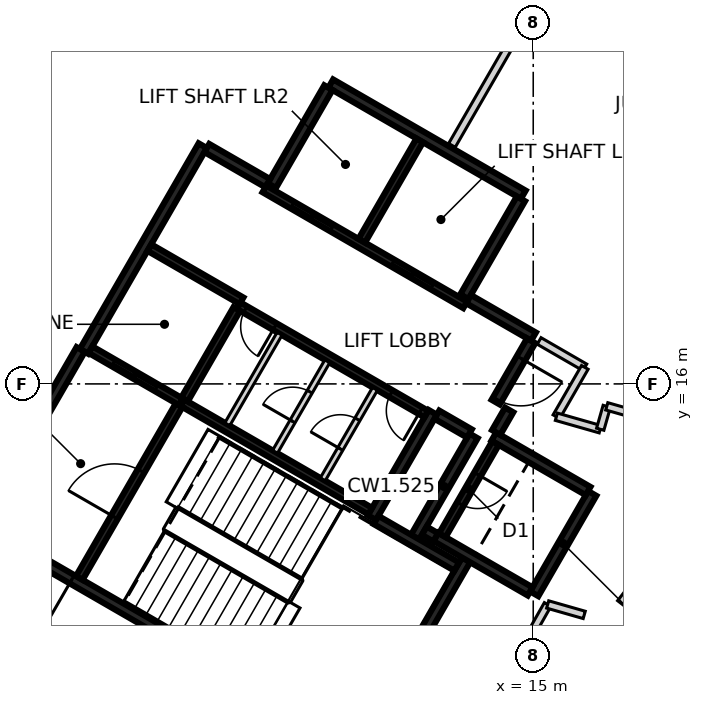
"""IFC4 building model, lengths in metres.
Left out: names, types, materials, properties, quantities, classifications, styles, units other than length and angle.
Written with IfcOpenShell. Run it as: python <this file> out.ifc"""

import sys

from ifc_helpers import new_model, si_unit, direction, frame, frame_2d, origin, place, context, subcontext, project, spatial, rectangle, extrude, element, fill, save


model = new_model("IFC4")
c1 = context("Model", 3, precision=1e-05, world=origin(), true_north=direction((0.0, 1.0)))
c2 = subcontext(c1, "Body", "Model", "MODEL_VIEW")
j1 = project(units=[si_unit("LENGTHUNIT", "METRE"), si_unit("PLANEANGLEUNIT", "RADIAN")], contexts=[c1])
p1 = place(None, origin())
s1 = spatial("IfcSite", under=j1, at=p1, CompositionType="ELEMENT")
p2 = place(p1, origin())
s2 = spatial("IfcBuilding", under=s1, at=p2, CompositionType="ELEMENT")
p3 = place(p2, frame((0.0, 0.0, 45.8)))
s3 = spatial("IfcBuildingStorey", under=s2, at=p3, CompositionType="ELEMENT", Elevation=45.8)
p4 = place(p3, frame((10.42, 6.498, 0.0), z_axis=(0.0, 0.0, 1.0), x_axis=(-0.866021906294, 0.500006057782, 0.0)))
e1 = element("IfcWall", 1, at=p4, inside=s3, PredefinedType="SHEAR", context=c2, shape_type="SweptSolid", body=[
    extrude(rectangle(XDim=11.55, YDim=0.25, at=frame_2d((5.775, 0.0))), origin(), (0.0, 0.0, 1.0), 3.125),
])
p5 = place(p4, frame((10.025, 0.0, 0.0)))
e2 = element("IfcOpeningElement", 2, at=p5, cuts=e1, PredefinedType="OPENING", context=c2, shape_type="SweptSolid", body=[
    extrude(rectangle(XDim=1.2, YDim=2.1, at=frame_2d((0.6, 1.05))), frame((0.0, 0.135, 0.0), z_axis=(0.0, -1.0, 0.0), x_axis=(1.0, 0.0, 0.0)), (0.0, 0.0, 1.0), 0.27),
])
p6 = place(p4, frame((8.725, 0.0, 0.0)))
e3 = element("IfcOpeningElement", 3, at=p6, cuts=e1, PredefinedType="OPENING", context=c2, shape_type="SweptSolid", body=[
    extrude(rectangle(XDim=1.2, YDim=2.1, at=frame_2d((0.6, 1.05))), frame((0.0, 0.135, 0.0), z_axis=(0.0, -1.0, 0.0), x_axis=(1.0, 0.0, 0.0)), (0.0, 0.0, 1.0), 0.27),
])
p7 = place(p3, frame((3.179, 16.856, 0.0), z_axis=(0.0, 0.0, 1.0), x_axis=(0.500004234368, 0.866022959057, 0.0)))
e4 = element("IfcWall", 4, at=p7, inside=s3, PredefinedType="SHEAR", context=c2, shape_type="SweptSolid", body=[
    extrude(rectangle(XDim=6.25, YDim=0.25, at=frame_2d((3.125, 0.0))), origin(), (0.0, 0.0, 1.0), 3.125),
])
p8 = place(p3, frame((9.673, 23.903, 0.0), z_axis=(0.0, 0.0, 1.0), x_axis=(0.86603616409, -0.499981362141, 0.0)))
e5 = element("IfcWall", 5, at=p8, inside=s3, PredefinedType="SHEAR", context=c2, shape_type="SweptSolid", body=[
    extrude(rectangle(XDim=5.85, YDim=0.25, at=frame_2d((2.925, 0.0))), origin(), (0.0, 0.0, 1.0), 3.125),
])
p9 = place(p3, frame((0.48, 12.381, 0.0), z_axis=(0.0, 0.0, 1.0), x_axis=(0.49999885962, 0.866026062182, 0.0)))
e6 = element("IfcWall", 6, at=p9, inside=s3, PredefinedType="SHEAR", context=c2, shape_type="SweptSolid", body=[
    extrude(rectangle(XDim=5.225, YDim=0.25, at=frame_2d((2.612, 0.0))), origin(), (0.0, 0.0, 1.0), 3.125),
])
p10 = place(p3, frame((13.238, 11.378, 0.0), z_axis=(0.0, 0.0, 1.0), x_axis=(-0.500008851346, -0.866020293397, 0.0)))
e7 = element("IfcWall", 7, at=p10, inside=s3, PredefinedType="SHEAR", context=c2, shape_type="SweptSolid", body=[
    extrude(rectangle(XDim=5.51, YDim=0.25, at=frame_2d((2.755, 0.0))), origin(), (0.0, 0.0, 1.0), 3.125),
])
p11 = place(p3, frame((12.357, 15.252, 0.0), z_axis=(0.0, 0.0, 1.0), x_axis=(-0.500028443584, -0.866008981251, 0.0)))
e8 = element("IfcWall", 8, at=p11, inside=s3, PredefinedType="SHEAR", context=c2, shape_type="SweptSolid", body=[
    extrude(rectangle(XDim=3.2, YDim=0.25, at=frame_2d((1.6, 0.0))), origin(), (0.0, 0.0, 1.0), 3.125),
])
for number, where, z_axis, x_axis in (
    (9, (8.123, 21.219, 0.0), (0.0, 0.0, 1.0), (0.5, 0.866, 0.0)),
    (10, (14.676, 20.87, 0.0), (0.0, 0.0, 1.0), (-0.5, -0.866, 0.0)),
):
    element("IfcWall", number, at=place(p3, frame(where, z_axis=z_axis, x_axis=x_axis)), inside=s3, PredefinedType="SHEAR", context=c2, shape_type="SweptSolid", body=[
        extrude(rectangle(XDim=2.975, YDim=0.25, at=frame_2d((1.487, 0.0))), origin(), (0.0, 0.0, 1.0), 3.125),
    ])
p12 = place(p3, frame((16.552, 13.119, 0.0), z_axis=(0.0, 0.0, 1.0), x_axis=(-0.499978833458, -0.866037623948, 0.0)))
e11 = element("IfcWall", 11, at=p12, inside=s3, PredefinedType="SHEAR", context=c2, shape_type="SweptSolid", body=[
    extrude(rectangle(XDim=3.05, YDim=0.25, at=frame_2d((1.525, 0.0))), origin(), (0.0, 0.0, 1.0), 3.125),
])
p13 = place(p3, frame((14.918, 10.54, 0.0), z_axis=(0.0, 0.0, 1.0), x_axis=(-0.866063538972, 0.499933942099, 0.0)))
e12 = element("IfcWall", 12, at=p13, inside=s3, PredefinedType="SHEAR", context=c2, shape_type="SweptSolid", body=[
    extrude(rectangle(XDim=2.865, YDim=0.25, at=frame_2d((1.432, 0.0))), origin(), (0.0, 0.0, 1.0), 3.125),
])
p14 = place(p3, frame((13.963, 14.614, 0.0), z_axis=(0.0, 0.0, 1.0), x_axis=(0.866042235819, -0.499970844928, 0.0)))
e13 = element("IfcWall", 13, at=p14, inside=s3, PredefinedType="SHEAR", context=c2, shape_type="SweptSolid", body=[
    extrude(rectangle(XDim=2.865, YDim=0.25, at=frame_2d((1.432, 0.0))), origin(), (0.0, 0.0, 1.0), 3.125),
])
p15 = place(p3, frame((11.888, 11.961, 0.0), z_axis=(0.0, 0.0, 1.0), x_axis=(0.500003324108, 0.866023484601, 0.0)))
e14 = element("IfcWall", 14, at=p15, inside=s3, PredefinedType="SHEAR", context=c2, shape_type="SweptSolid", body=[
    extrude(rectangle(XDim=3.085, YDim=0.25, at=frame_2d((1.542, 0.0))), origin(), (0.0, 0.0, 1.0), 3.125),
])
p16 = place(p3, frame((10.865, 12.418, 0.0), z_axis=(0.0, 0.0, 1.0), x_axis=(0.866026229868, -0.499998569178, 0.0)))
e15 = element("IfcWall", 15, at=p16, inside=s3, PredefinedType="SHEAR", context=c2, shape_type="SweptSolid", body=[
    extrude(rectangle(XDim=2.449, YDim=0.25, at=frame_2d((1.225, 0.0))), origin(), (0.0, 0.0, 1.0), 3.125),
])
p17 = place(p3, frame((13.297, 18.231, 0.0), z_axis=(0.0, 0.0, 1.0), x_axis=(0.866043531843, -0.499968599967, 0.0)))
e16 = element("IfcWall", 16, at=p17, inside=s3, PredefinedType="SHEAR", context=c2, shape_type="SweptSolid", body=[
    extrude(rectangle(XDim=1.975, YDim=0.25, at=frame_2d((0.987, 0.0))), origin(), (0.0, 0.0, 1.0), 3.125),
])
p18 = place(p3, frame((6.413, 22.206, 0.0), z_axis=(0.0, 0.0, 1.0), x_axis=(0.866016279763, -0.500015802937, 0.0)))
e17 = element("IfcWall", 17, at=p18, inside=s3, PredefinedType="SHEAR", context=c2, shape_type="SweptSolid", body=[
    extrude(rectangle(XDim=1.849, YDim=0.25, at=frame_2d((0.925, 0.0))), origin(), (0.0, 0.0, 1.0), 3.125),
])
p19 = place(p3, frame((14.945, 17.135, 0.0), z_axis=(0.0, 0.0, 1.0), x_axis=(-0.499983108224, -0.866035156036, 0.0)))
e18 = element("IfcWall", 18, at=p19, inside=s3, PredefinedType="SHEAR", context=c2, shape_type="SweptSolid", body=[
    extrude(rectangle(XDim=1.865, YDim=0.25, at=frame_2d((0.932, 0.0))), origin(), (0.0, 0.0, 1.0), 3.125),
])
p20 = place(p19, frame((0.535, 0.0, 0.0)))
e19 = element("IfcOpeningElement", 19, at=p20, cuts=e18, PredefinedType="OPENING", context=c2, shape_type="SweptSolid", body=[
    extrude(rectangle(XDim=1.25, YDim=2.1, at=frame_2d((0.625, 1.05))), frame((0.0, 0.135, 0.0), z_axis=(0.0, -1.0, 0.0), x_axis=(1.0, 0.0, 0.0)), (0.0, 0.0, 1.0), 0.27),
])
p21 = place(p3, frame((13.322, 14.695, 0.0), z_axis=(0.0, 0.0, 1.0), x_axis=(-0.866017078145, 0.500014420154, 0.0)))
e20 = element("IfcWall", 20, at=p21, inside=s3, PredefinedType="SHEAR", context=c2, shape_type="SweptSolid", body=[
    extrude(rectangle(XDim=0.989, YDim=0.25, at=frame_2d((0.495, 0.0))), origin(), (0.0, 0.0, 1.0), 3.125),
])
p22 = place(p3, frame((14.368, 15.315, 0.0), z_axis=(0.0, 0.0, 1.0), x_axis=(-0.499897359611, -0.866084655132, 0.0)))
e21 = element("IfcWall", 21, at=p22, inside=s3, PredefinedType="SHEAR", context=c2, shape_type="SweptSolid", body=[
    extrude(rectangle(XDim=0.685, YDim=0.25, at=frame_2d((0.342, 0.0))), origin(), (0.0, 0.0, 1.0), 3.125),
])
p23 = place(p3, frame((12.433, 11.964, 0.0), z_axis=(0.0, 0.0, 1.0), x_axis=(-0.866055875208, 0.499947218231, 0.0)))
e22 = element("IfcWall", 22, at=p23, inside=s3, PredefinedType="SHEAR", context=c2, shape_type="SweptSolid", body=[
    extrude(rectangle(XDim=0.345, YDim=0.25, at=frame_2d((0.172, 0.0))), origin(), (0.0, 0.0, 1.0), 3.125),
])
p24 = place(p3, frame((13.21, 18.08, 0.0), z_axis=(0.0, 0.0, 1.0), x_axis=(-0.866030299012, 0.499991521122, 0.0)))
e23 = element("IfcWall", 23, at=p24, inside=s3, PredefinedType="SHEAR", context=c2, shape_type="SweptSolid", body=[
    extrude(rectangle(XDim=6.1, YDim=0.2, at=frame_2d((3.05, 0.0))), origin(), (0.0, 0.0, 1.0), 3.125),
])
p25 = place(p24, frame((1.0, 0.0, 0.0)))
e24 = element("IfcOpeningElement", 24, at=p25, cuts=e23, PredefinedType="OPENING", context=c2, shape_type="SweptSolid", body=[
    extrude(rectangle(XDim=1.2, YDim=2.1, at=frame_2d((0.6, 1.05))), frame((0.0, 0.11, 0.0), z_axis=(0.0, -1.0, 0.0), x_axis=(1.0, 0.0, 0.0)), (0.0, 0.0, 1.0), 0.22),
])
p26 = place(p24, frame((4.05, 0.0, 0.0)))
e25 = element("IfcOpeningElement", 25, at=p26, cuts=e23, PredefinedType="OPENING", context=c2, shape_type="SweptSolid", body=[
    extrude(rectangle(XDim=1.2, YDim=2.1, at=frame_2d((0.6, 1.05))), frame((0.0, 0.11, 0.0), z_axis=(0.0, -1.0, 0.0), x_axis=(1.0, 0.0, 0.0)), (0.0, 0.0, 1.0), 0.22),
])
p27 = place(p3, frame((5.775, 15.502, 0.0), z_axis=(0.0, 0.0, 1.0), x_axis=(0.866020080793, -0.500009219579, 0.0)))
e26 = element("IfcWall", 26, at=p27, inside=s3, PredefinedType="SHEAR", context=c2, shape_type="SweptSolid", body=[
    extrude(rectangle(XDim=5.699, YDim=0.2, at=frame_2d((2.85, 0.0))), origin(), (0.0, 0.0, 1.0), 3.125),
])
p28 = place(p3, frame((12.185, 15.207, 0.0), z_axis=(0.0, 0.0, 1.0), x_axis=(-0.866020080793, 0.500009219579, 0.0)))
e27 = element("IfcWall", 27, at=p28, inside=s3, PredefinedType="SHEAR", context=c2, shape_type="SweptSolid", body=[
    extrude(rectangle(XDim=5.699, YDim=0.2, at=frame_2d((2.85, 0.0))), origin(), (0.0, 0.0, 1.0), 3.125),
])
p29 = place(p28, frame((0.174, 0.0, 0.0)))
e28 = element("IfcOpeningElement", 28, at=p29, cuts=e27, PredefinedType="OPENING", context=c2, shape_type="SweptSolid", body=[
    extrude(rectangle(XDim=0.9, YDim=2.1, at=frame_2d((0.45, 1.05))), frame((0.0, 0.11, 0.0), z_axis=(0.0, -1.0, 0.0), x_axis=(1.0, 0.0, 0.0)), (0.0, 0.0, 1.0), 0.22),
])
p30 = place(p28, frame((4.599, 0.0, 0.0)))
e29 = element("IfcOpeningElement", 29, at=p30, cuts=e27, PredefinedType="OPENING", context=c2, shape_type="SweptSolid", body=[
    extrude(rectangle(XDim=0.9, YDim=2.1, at=frame_2d((0.45, 1.05))), frame((0.0, 0.11, 0.0), z_axis=(0.0, -1.0, 0.0), x_axis=(1.0, 0.0, 0.0)), (0.0, 0.0, 1.0), 0.22),
])
p31 = place(p3, frame((3.057, 10.895, 0.0), z_axis=(0.0, 0.0, 1.0), x_axis=(0.499989418164, 0.866031513124, 0.0)))
e30 = element("IfcWall", 30, at=p31, inside=s3, PredefinedType="SHEAR", context=c2, shape_type="SweptSolid", body=[
    extrude(rectangle(XDim=5.251, YDim=0.2, at=frame_2d((2.625, 0.0))), origin(), (0.0, 0.0, 1.0), 3.125),
])
p32 = place(p31, frame((1.849, 0.0, 0.0)))
e31 = element("IfcOpeningElement", 31, at=p32, cuts=e30, PredefinedType="OPENING", context=c2, shape_type="SweptSolid", body=[
    extrude(rectangle(XDim=1.4, YDim=2.1, at=frame_2d((0.7, 1.05))), frame((0.0, 0.11, 0.0), z_axis=(0.0, -1.0, 0.0), x_axis=(1.0, 0.0, 0.0)), (0.0, 0.0, 1.0), 0.22),
])
p33 = place(p3, frame((10.489, 19.767, 0.0), z_axis=(0.0, 0.0, 1.0), x_axis=(0.499946628782, 0.866056215479, 0.0)))
e32 = element("IfcWall", 32, at=p33, inside=s3, PredefinedType="SHEAR", context=c2, shape_type="SweptSolid", body=[
    extrude(rectangle(XDim=3.048, YDim=0.2, at=frame_2d((1.524, 0.0))), origin(), (0.0, 0.0, 1.0), 3.125),
])
p34 = place(p3, frame((14.008, 14.442, 0.0), z_axis=(0.0, 0.0, 1.0), x_axis=(-0.499986818241, -0.866033014143, 0.0)))
e33 = element("IfcWall", 33, at=p34, inside=s3, PredefinedType="SHEAR", context=c2, shape_type="SweptSolid", body=[
    extrude(rectangle(XDim=2.798, YDim=0.2, at=frame_2d((1.399, 0.0))), origin(), (0.0, 0.0, 1.0), 3.125),
])
p35 = place(p34, frame((0.949, 0.0, 0.0)))
e34 = element("IfcOpeningElement", 34, at=p35, cuts=e33, PredefinedType="OPENING", context=c2, shape_type="SweptSolid", body=[
    extrude(rectangle(XDim=0.9, YDim=2.1, at=frame_2d((0.45, 1.05))), frame((0.0, 0.11, 0.0), z_axis=(0.0, -1.0, 0.0), x_axis=(1.0, 0.0, 0.0)), (0.0, 0.0, 1.0), 0.22),
])
p36 = place(p3, frame((7.199, 17.97, 0.0), z_axis=(0.0, 0.0, 1.0), x_axis=(-0.499968400327, -0.866043647095, 0.0)))
e35 = element("IfcWall", 35, at=p36, inside=s3, PredefinedType="SHEAR", context=c2, shape_type="SweptSolid", body=[
    extrude(rectangle(XDim=2.75, YDim=0.2, at=frame_2d((1.375, 0.0))), origin(), (0.0, 0.0, 1.0), 3.125),
])
p37 = place(p3, frame((5.725, 15.531, 0.0), z_axis=(0.0, 0.0, 1.0), x_axis=(-0.866037306777, 0.499979382845, 0.0)))
e36 = element("IfcWall", 36, at=p37, inside=s3, PredefinedType="SHEAR", context=c2, shape_type="SweptSolid", body=[
    extrude(rectangle(XDim=2.742, YDim=0.2, at=frame_2d((1.371, 0.0))), origin(), (0.0, 0.0, 1.0), 3.125),
])
p38 = place(p37, frame((0.743, 0.0, 0.0)))
e37 = element("IfcOpeningElement", 37, at=p38, cuts=e36, PredefinedType="OPENING", context=c2, shape_type="SweptSolid", body=[
    extrude(rectangle(XDim=1.3, YDim=2.1, at=frame_2d((0.65, 1.05))), frame((0.0, 0.11, 0.0), z_axis=(0.0, -1.0, 0.0), x_axis=(1.0, 0.0, 0.0)), (0.0, 0.0, 1.0), 0.22),
])
p39 = place(p3, frame((4.901, 19.586, 0.0), z_axis=(0.0, 0.0, 1.0), x_axis=(0.866022890907, -0.500004352405, 0.0)))
e38 = element("IfcWall", 38, at=p39, inside=s3, PredefinedType="SHEAR", context=c2, shape_type="SweptSolid", body=[
    extrude(rectangle(XDim=2.799, YDim=0.2, at=frame_2d((1.399, 0.0))), origin(), (0.0, 0.0, 1.0), 3.125),
])
p40 = place(p3, frame((9.462, 13.489, 0.0), z_axis=(0.0, 0.0, 1.0), x_axis=(0.50002746344, 0.86600954718, 0.0)))
e39 = element("IfcWall", 39, at=p40, inside=s3, PredefinedType="PARTITIONING", context=c2, shape_type="SweptSolid", body=[
    extrude(rectangle(XDim=2.748, YDim=0.15, at=frame_2d((1.374, 0.0))), origin(), (0.0, 0.0, 1.0), 3.125),
])
p41 = place(p40, frame((0.924, 0.0, 0.0)))
e40 = element("IfcOpeningElement", 40, at=p41, cuts=e39, PredefinedType="OPENING", context=c2, shape_type="SweptSolid", body=[
    extrude(rectangle(XDim=0.9, YDim=2.1, at=frame_2d((0.45, 1.05))), frame((0.0, 0.085, 0.0), z_axis=(0.0, -1.0, 0.0), x_axis=(1.0, 0.0, 0.0)), (0.0, 0.0, 1.0), 0.17),
])
p42 = place(p3, frame((8.207, 14.214, 0.0), z_axis=(0.0, 0.0, 1.0), x_axis=(0.499922376475, 0.866070215109, 0.0)))
e41 = element("IfcWall", 41, at=p42, inside=s3, PredefinedType="PARTITIONING", context=c2, shape_type="SweptSolid", body=[
    extrude(rectangle(XDim=2.749, YDim=0.15, at=frame_2d((1.374, 0.0))), origin(), (0.0, 0.0, 1.0), 3.125),
])
p43 = place(p42, frame((0.924, 0.0, 0.0)))
e42 = element("IfcOpeningElement", 42, at=p43, cuts=e41, PredefinedType="OPENING", context=c2, shape_type="SweptSolid", body=[
    extrude(rectangle(XDim=0.9, YDim=2.1, at=frame_2d((0.45, 1.05))), frame((0.0, 0.085, 0.0), z_axis=(0.0, -1.0, 0.0), x_axis=(1.0, 0.0, 0.0)), (0.0, 0.0, 1.0), 0.17),
])
p44 = place(p3, frame((6.951, 14.939, 0.0), z_axis=(0.0, 0.0, 1.0), x_axis=(0.50002746344, 0.86600954718, 0.0)))
e43 = element("IfcWall", 43, at=p44, inside=s3, PredefinedType="PARTITIONING", context=c2, shape_type="SweptSolid", body=[
    extrude(rectangle(XDim=2.748, YDim=0.15, at=frame_2d((1.374, 0.0))), origin(), (0.0, 0.0, 1.0), 3.125),
])
p45 = place(p3, frame((12.432, 4.992, 0.0), z_axis=(0.0, 0.0, 1.0), x_axis=(0.492790102015, 0.870148214591, 0.0)))
e44 = element("IfcWall", 44, at=p45, inside=s3, PredefinedType="PARTITIONING", context=c2, shape_type="SweptSolid", body=[
    extrude(rectangle(XDim=5.981, YDim=0.2, at=frame_2d((2.991, 0.0))), origin(), (0.0, 0.0, 1.0), 3.125),
])
p46 = place(p3, frame((15.156, 17.13, 0.0), z_axis=(0.0, 0.0, 1.0), x_axis=(0.865755062894, -0.500467952093, 0.0)))
e45 = element("IfcWall", 45, at=p46, inside=s3, PredefinedType="PARTITIONING", context=c2, shape_type="SweptSolid", body=[
    extrude(rectangle(XDim=1.389, YDim=0.2, at=frame_2d((0.694, 0.0))), origin(), (0.0, 0.0, 1.0), 3.125),
])
p47 = place(p3, frame((15.38, 10.197, 0.0), z_axis=(0.0, 0.0, 1.0), x_axis=(0.961523947641, -0.274721127897, 0.0)))
e46 = element("IfcWall", 46, at=p47, inside=s3, PredefinedType="PARTITIONING", context=c2, shape_type="SweptSolid", body=[
    extrude(rectangle(XDim=1.001, YDim=0.2, at=frame_2d((0.5, 0.0))), origin(), (0.0, 0.0, 1.0), 3.125),
])
p48 = place(p3, frame((15.609, 15.136, 0.0), z_axis=(0.0, 0.0, 1.0), x_axis=(0.499501622561, 0.866312950993, 0.0)))
e47 = element("IfcWall", 47, at=p48, inside=s3, PredefinedType="PARTITIONING", context=c2, shape_type="SweptSolid", body=[
    extrude(rectangle(XDim=1.5, YDim=0.2, at=frame_2d((0.75, 0.0))), origin(), (0.0, 0.0, 1.0), 3.125),
])
p49 = place(p3, frame((15.609, 15.136, 0.0), z_axis=(0.0, 0.0, 1.0), x_axis=(0.961662011825, -0.274237442763, 0.0)))
e48 = element("IfcWall", 48, at=p49, inside=s3, PredefinedType="PARTITIONING", context=c2, shape_type="SweptSolid", body=[
    extrude(rectangle(XDim=1.2, YDim=0.2, at=frame_2d((0.6, 0.0))), origin(), (0.0, 0.0, 1.0), 3.125),
])
p50 = place(p3, frame((16.763, 14.807, 0.0), z_axis=(0.0, 0.0, 1.0), x_axis=(0.274464026122, 0.961597368115, 0.0)))
e49 = element("IfcWall", 49, at=p50, inside=s3, PredefinedType="PARTITIONING", context=c2, shape_type="SweptSolid", body=[
    extrude(rectangle(XDim=0.627, YDim=0.2, at=frame_2d((0.313, 0.0))), origin(), (0.0, 0.0, 1.0), 3.125),
])
p51 = place(p3, frame((16.935, 15.41, 0.0), z_axis=(0.0, 0.0, 1.0), x_axis=(0.961602664273, -0.274445470107, 0.0)))
e50 = element("IfcWall", 50, at=p51, inside=s3, PredefinedType="PARTITIONING", context=c2, shape_type="SweptSolid", body=[
    extrude(rectangle(XDim=0.936, YDim=0.2, at=frame_2d((0.468, 0.0))), origin(), (0.0, 0.0, 1.0), 3.125),
])
p52 = place(p3, frame((17.299, 10.235, 0.0), z_axis=(0.0, 0.0, 1.0), x_axis=(0.61377461522, 0.789481299153, 0.0)))
e51 = element("IfcWall", 51, at=p52, inside=s3, PredefinedType="PARTITIONING", context=c2, shape_type="SweptSolid", body=[
    extrude(rectangle(XDim=2.851, YDim=0.2, at=frame_2d((1.426, 0.0))), origin(), (0.0, 0.0, 1.0), 3.125),
])
p53 = place(p3, frame((12.861, 22.276, 0.0), z_axis=(0.0, 0.0, 1.0), x_axis=(0.499824227645, 0.86612686222, 0.0)))
e52 = element("IfcWall", 52, at=p53, inside=s3, PredefinedType="PARTITIONING", context=c2, shape_type="SweptSolid", body=[
    extrude(rectangle(XDim=7.753, YDim=0.2, at=frame_2d((3.876, 0.0))), origin(), (0.0, 0.0, 1.0), 3.125),
])
p54 = place(p38, origin())
e53 = element("IfcDoor", 53, at=p54, inside=s3, OperationType="SLIDING_TO_RIGHT", PredefinedType="DOOR", context=c2, shape_type="SweptSolid", body=[
    extrude(rectangle(XDim=1.3, YDim=2.1, at=frame_2d((0.65, 1.05))), frame((0.0, 0.025, 0.0), z_axis=(0.0, -1.0, 0.0), x_axis=(1.0, 0.0, 0.0)), (0.0, 0.0, 1.0), 0.05),
])
fill(e37, e53)
p55 = place(p25, origin())
e54 = element("IfcDoor", 54, at=p55, inside=s3, OperationType="DOUBLE_DOOR_SLIDING", PredefinedType="DOOR", context=c2, shape_type="SweptSolid", body=[
    extrude(rectangle(XDim=1.2, YDim=2.1, at=frame_2d((0.6, 1.05))), frame((0.0, 0.025, 0.0), z_axis=(0.0, -1.0, 0.0), x_axis=(1.0, 0.0, 0.0)), (0.0, 0.0, 1.0), 0.05),
])
fill(e24, e54)
p56 = place(p26, origin())
e55 = element("IfcDoor", 55, at=p56, inside=s3, OperationType="DOUBLE_DOOR_SLIDING", PredefinedType="DOOR", context=c2, shape_type="SweptSolid", body=[
    extrude(rectangle(XDim=1.2, YDim=2.1, at=frame_2d((0.6, 1.05))), frame((0.0, 0.025, 0.0), z_axis=(0.0, -1.0, 0.0), x_axis=(1.0, 0.0, 0.0)), (0.0, 0.0, 1.0), 0.05),
])
fill(e25, e55)
p57 = place(p20, origin())
e56 = element("IfcDoor", 56, at=p57, inside=s3, OperationType="SINGLE_SWING_LEFT", PredefinedType="DOOR", context=c2, shape_type="SweptSolid", body=[
    extrude(rectangle(XDim=1.25, YDim=2.1, at=frame_2d((0.625, 1.05))), frame((0.0, 0.025, 0.0), z_axis=(0.0, -1.0, 0.0), x_axis=(1.0, 0.0, 0.0)), (0.0, 0.0, 1.0), 0.05),
])
fill(e19, e56)
p58 = place(p6, origin())
e57 = element("IfcDoor", 57, at=p58, inside=s3, OperationType="SINGLE_SWING_RIGHT", PredefinedType="DOOR", context=c2, shape_type="SweptSolid", body=[
    extrude(rectangle(XDim=1.2, YDim=2.1, at=frame_2d((0.6, 1.05))), frame((0.0, 0.025, 0.0), z_axis=(0.0, -1.0, 0.0), x_axis=(1.0, 0.0, 0.0)), (0.0, 0.0, 1.0), 0.05),
])
fill(e3, e57)
p59 = place(p32, origin())
e58 = element("IfcDoor", 58, at=p59, inside=s3, OperationType="SINGLE_SWING_RIGHT", PredefinedType="DOOR", context=c2, shape_type="SweptSolid", body=[
    extrude(rectangle(XDim=1.4, YDim=2.1, at=frame_2d((0.7, 1.05))), frame((0.0, 0.025, 0.0), z_axis=(0.0, -1.0, 0.0), x_axis=(1.0, 0.0, 0.0)), (0.0, 0.0, 1.0), 0.05),
])
fill(e31, e58)
p60 = place(p29, origin())
e59 = element("IfcDoor", 59, at=p60, inside=s3, OperationType="SINGLE_SWING_LEFT", PredefinedType="DOOR", context=c2, shape_type="SweptSolid", body=[
    extrude(rectangle(XDim=0.9, YDim=2.1, at=frame_2d((0.45, 1.05))), frame((0.0, 0.025, 0.0), z_axis=(0.0, -1.0, 0.0), x_axis=(1.0, 0.0, 0.0)), (0.0, 0.0, 1.0), 0.05),
])
fill(e28, e59)
p61 = place(p41, origin())
e60 = element("IfcDoor", 60, at=p61, inside=s3, OperationType="SINGLE_SWING_RIGHT", PredefinedType="DOOR", context=c2, shape_type="SweptSolid", body=[
    extrude(rectangle(XDim=0.9, YDim=2.1, at=frame_2d((0.45, 1.05))), frame((0.0, 0.025, 0.0), z_axis=(0.0, -1.0, 0.0), x_axis=(1.0, 0.0, 0.0)), (0.0, 0.0, 1.0), 0.05),
])
fill(e40, e60)
p62 = place(p43, origin())
e61 = element("IfcDoor", 61, at=p62, inside=s3, OperationType="SINGLE_SWING_LEFT", PredefinedType="DOOR", context=c2, shape_type="SweptSolid", body=[
    extrude(rectangle(XDim=0.9, YDim=2.1, at=frame_2d((0.45, 1.05))), frame((0.0, 0.025, 0.0), z_axis=(0.0, -1.0, 0.0), x_axis=(1.0, 0.0, 0.0)), (0.0, 0.0, 1.0), 0.05),
])
fill(e42, e61)
p63 = place(p30, origin())
e62 = element("IfcDoor", 62, at=p63, inside=s3, OperationType="SINGLE_SWING_RIGHT", PredefinedType="DOOR", context=c2, shape_type="SweptSolid", body=[
    extrude(rectangle(XDim=0.9, YDim=2.1, at=frame_2d((0.45, 1.05))), frame((0.0, 0.025, 0.0), z_axis=(0.0, -1.0, 0.0), x_axis=(1.0, 0.0, 0.0)), (0.0, 0.0, 1.0), 0.05),
])
fill(e29, e62)
p64 = place(p35, origin())
e63 = element("IfcDoor", 63, at=p64, inside=s3, OperationType="SINGLE_SWING_LEFT", PredefinedType="DOOR", context=c2, shape_type="SweptSolid", body=[
    extrude(rectangle(XDim=0.9, YDim=2.1, at=frame_2d((0.45, 1.05))), frame((0.0, 0.025, 0.0), z_axis=(0.0, -1.0, 0.0), x_axis=(1.0, 0.0, 0.0)), (0.0, 0.0, 1.0), 0.05),
])
fill(e34, e63)
save(model, sys.argv[1])
